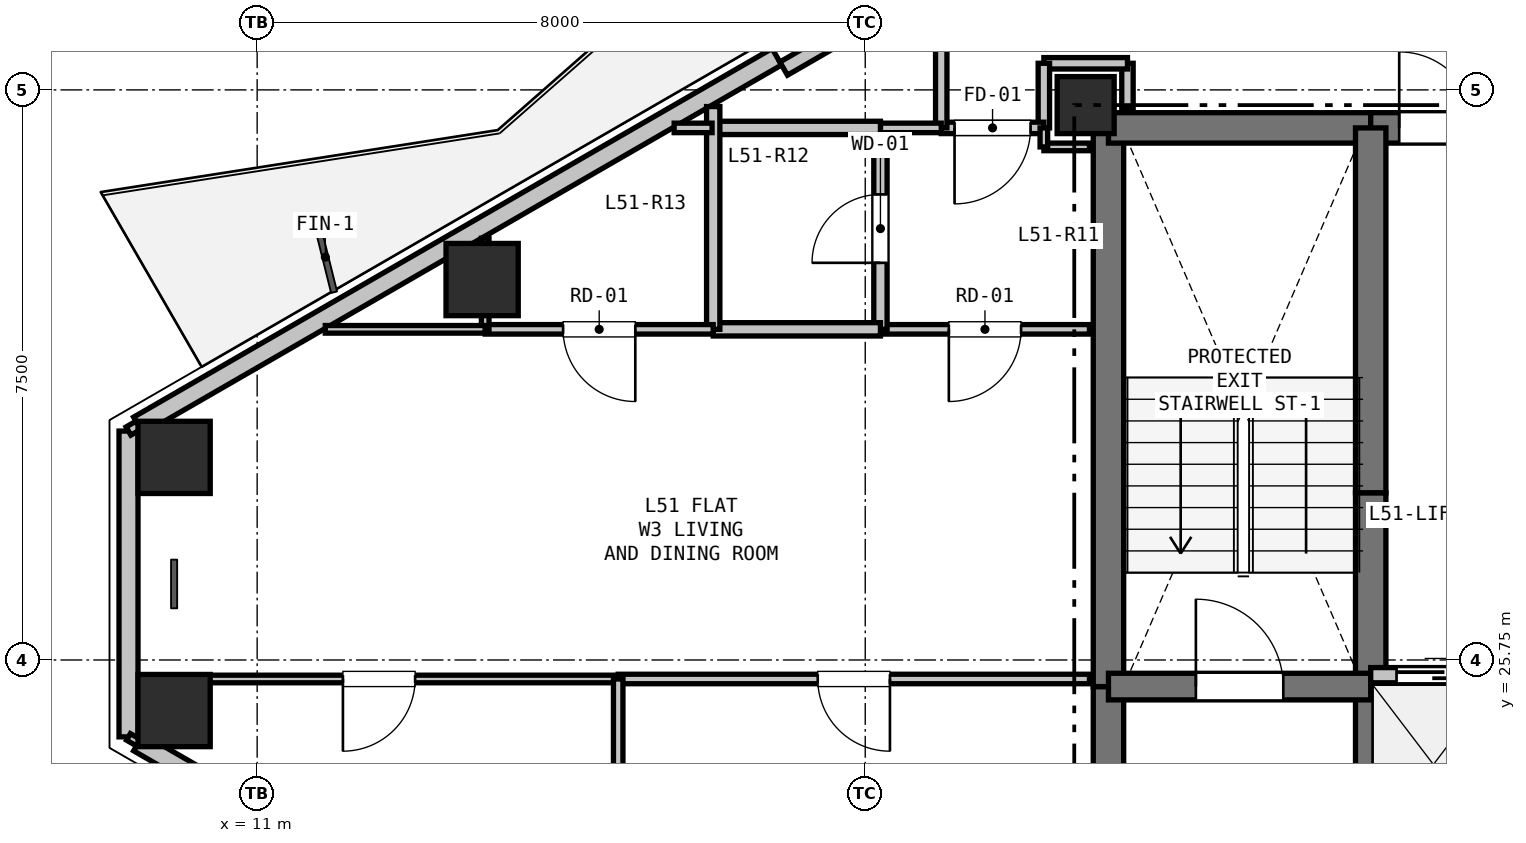
"""IFC4 building model, lengths in metres.
Left out: names, types, materials, properties, quantities, classifications, styles, units other than length and angle.
Written with IfcOpenShell. Run it as: python <this file> out.ifc"""

import sys

from ifc_helpers import new_model, si_unit, direction, frame, frame_2d, origin, origin_2d, place, context, subcontext, project, spatial, rectangle, hollow_rectangle, extrude, element, fill, save


model = new_model("IFC4")
c1 = context("Model", 3, precision=1e-05, world=origin(), true_north=direction((0.0, 1.0)))
c2 = subcontext(c1, "Body", "Model", "MODEL_VIEW")
j1 = project(units=[si_unit("LENGTHUNIT", "METRE"), si_unit("PLANEANGLEUNIT", "RADIAN")], contexts=[c1])
p1 = place(None, origin())
s1 = spatial("IfcSite", under=j1, at=p1, CompositionType="ELEMENT")
p2 = place(p1, origin())
s2 = spatial("IfcBuilding", under=s1, at=p2, CompositionType="ELEMENT")
p3 = place(p2, frame((0.0, 0.0, 185.4)))
s3 = spatial("IfcBuildingStorey", under=s2, at=p3, CompositionType="ELEMENT", Elevation=185.4)
p4 = place(p3, frame((21.9, 33.05, 0.0), z_axis=(0.0, 0.0, 1.0), x_axis=(1.0, 0.0, 0.0)))
e1 = element("IfcColumn", 1, at=p4, inside=s3, PredefinedType="COLUMN", context=c2, shape_type="SweptSolid", body=[
    extrude(rectangle(XDim=0.75, YDim=0.75, at=origin_2d()), origin(), (0.0, 0.0, 1.0), 3.3),
])
for number, where, z_axis, x_axis in (
    (2, (9.907, 28.415, 0.0), (0.0, 0.0, 1.0), (1.0, 0.0, 0.0)),
    (3, (13.96, 30.755, 0.0), (0.0, 0.0, 1.0), (1.0, 0.0, 0.0)),
    (4, (9.907, 25.085, 0.0), (0.0, 0.0, 1.0), (1.0, 0.0, 0.0)),
):
    element("IfcColumn", number, at=place(p3, frame(where, z_axis=z_axis, x_axis=x_axis)), inside=s3, PredefinedType="COLUMN", context=c2, shape_type="SweptSolid", body=[
        extrude(hollow_rectangle(XDim=0.95, YDim=0.95, WallThickness=0.028, at=origin_2d()), origin(), (0.0, 0.0, 1.0), 3.3),
    ])
p5 = place(p3, frame((9.308, 24.738, 0.0), z_axis=(0.0, 0.0, 1.0), x_axis=(0.0, 1.0, 0.0)))
e5 = element("IfcWall", 5, at=p5, inside=s3, PredefinedType="SOLIDWALL", context=c2, shape_type="SweptSolid", body=[
    extrude(rectangle(XDim=4.023, YDim=0.25, at=frame_2d((2.012, 0.0))), origin(), (0.0, 0.0, 1.0), 2.69),
])
p6 = place(p3, frame((9.438, 28.837, 0.0), z_axis=(0.0, 0.0, 1.0), x_axis=(0.866027133173, 0.499997004599, 0.0)))
e6 = element("IfcWall", 6, at=p6, inside=s3, PredefinedType="SOLIDWALL", context=c2, shape_type="SweptSolid", body=[
    extrude(rectangle(XDim=9.699, YDim=0.25, at=frame_2d((4.849, 0.0))), origin(), (0.0, 0.0, 1.0), 2.69),
])
p7 = place(p3, frame((17.927, 33.53, 0.0), z_axis=(0.0, 0.0, 1.0), x_axis=(0.86605165483, 0.499954529098, 0.0)))
e7 = element("IfcWall", 7, at=p7, inside=s3, PredefinedType="PARAPET", context=c2, shape_type="SweptSolid", body=[
    extrude(rectangle(XDim=1.7, YDim=0.2, at=frame_2d((0.85, 0.0))), origin(), (0.0, 0.0, 1.0), 2.69),
])
p8 = place(p3, frame((17.837, 19.814, 0.0), z_axis=(0.0, 0.0, 1.0), x_axis=(-0.866027133173, 0.499997004599, 0.0)))
e8 = element("IfcWall", 8, at=p8, inside=s3, PredefinedType="SOLIDWALL", context=c2, shape_type="SweptSolid", body=[
    extrude(rectangle(XDim=9.699, YDim=0.25, at=frame_2d((4.849, 0.0))), origin(), (0.0, 0.0, 1.0), 2.69),
])
p9 = place(p8, frame((5.512, 0.0, 0.9)))
e9 = element("IfcOpeningElement", 9, at=p9, cuts=e8, PredefinedType="OPENING", context=c2, shape_type="SweptSolid", body=[
    extrude(rectangle(XDim=1.2, YDim=1.4, at=frame_2d((0.6, 0.7))), frame((0.0, 0.135, 0.0), z_axis=(0.0, -1.0, 0.0), x_axis=(1.0, 0.0, 0.0)), (0.0, 0.0, 1.0), 0.27),
])
p10 = place(p3, frame((22.2, 20.75, 0.0), z_axis=(0.0, 0.0, 1.0), x_axis=(0.0, 1.0, 0.0)))
e10 = element("IfcWall", 10, at=p10, inside=s3, PredefinedType="SHEAR", context=c2, shape_type="SweptSolid", body=[
    extrude(rectangle(XDim=4.65, YDim=0.4, at=frame_2d((2.325, 0.0))), origin(), (0.0, 0.0, 1.0), 3.07),
])
p11 = place(p3, frame((22.2, 25.4, 0.0), z_axis=(0.0, 0.0, 1.0), x_axis=(0.0, 1.0, 0.0)))
e11 = element("IfcWall", 11, at=p11, inside=s3, PredefinedType="SHEAR", context=c2, shape_type="SweptSolid", body=[
    extrude(rectangle(XDim=7.35, YDim=0.4, at=frame_2d((3.675, 0.0))), origin(), (0.0, 0.0, 1.0), 3.07),
])
p12 = place(p3, frame((22.2, 32.75, 0.0), z_axis=(0.0, 0.0, 1.0), x_axis=(1.0, 0.0, 0.0)))
e12 = element("IfcWall", 12, at=p12, inside=s3, PredefinedType="SHEAR", context=c2, shape_type="SweptSolid", body=[
    extrude(rectangle(XDim=3.45, YDim=0.4, at=frame_2d((1.725, 0.0))), origin(), (0.0, 0.0, 1.0), 3.07),
])
p13 = place(p3, frame((25.65, 32.75, 0.0), z_axis=(0.0, 0.0, 1.0), x_axis=(1.0, 0.0, 0.0)))
e13 = element("IfcWall", 13, at=p13, inside=s3, PredefinedType="SHEAR", context=c2, shape_type="SweptSolid", body=[
    extrude(rectangle(XDim=1.75, YDim=0.4, at=frame_2d((0.875, 0.0))), origin(), (0.0, 0.0, 1.0), 3.07),
])
p14 = place(p13, frame((0.375, 0.0, 0.0)))
e14 = element("IfcOpeningElement", 14, at=p14, cuts=e13, PredefinedType="OPENING", context=c2, shape_type="SweptSolid", body=[
    extrude(rectangle(XDim=1.0, YDim=2.15, at=frame_2d((0.5, 1.075))), frame((0.0, 0.21, 0.0), z_axis=(0.0, -1.0, 0.0), x_axis=(1.0, 0.0, 0.0)), (0.0, 0.0, 1.0), 0.42),
])
p15 = place(p3, frame((25.65, 22.75, 0.0), z_axis=(0.0, 0.0, 1.0), x_axis=(0.0, 1.0, 0.0)))
e15 = element("IfcWall", 15, at=p15, inside=s3, PredefinedType="SHEAR", context=c2, shape_type="SweptSolid", body=[
    extrude(rectangle(XDim=2.8, YDim=0.4, at=frame_2d((1.4, 0.0))), origin(), (0.0, 0.0, 1.0), 3.07),
])
p16 = place(p3, frame((25.65, 25.55, 0.0), z_axis=(0.0, 0.0, 1.0), x_axis=(0.0, 1.0, 0.0)))
e16 = element("IfcWall", 16, at=p16, inside=s3, PredefinedType="SHEAR", context=c2, shape_type="SweptSolid", body=[
    extrude(rectangle(XDim=2.4, YDim=0.4, at=frame_2d((1.2, 0.0))), origin(), (0.0, 0.0, 1.0), 3.07),
])
p17 = place(p3, frame((25.65, 27.95, 0.0), z_axis=(0.0, 0.0, 1.0), x_axis=(0.0, 1.0, 0.0)))
e17 = element("IfcWall", 17, at=p17, inside=s3, PredefinedType="SHEAR", context=c2, shape_type="SweptSolid", body=[
    extrude(rectangle(XDim=4.8, YDim=0.4, at=frame_2d((2.4, 0.0))), origin(), (0.0, 0.0, 1.0), 3.07),
])
p18 = place(p3, frame((22.2, 25.4, 0.0), z_axis=(0.0, 0.0, 1.0), x_axis=(1.0, 0.0, 0.0)))
e18 = element("IfcWall", 18, at=p18, inside=s3, PredefinedType="SHEAR", context=c2, shape_type="SweptSolid", body=[
    extrude(rectangle(XDim=3.45, YDim=0.35, at=frame_2d((1.725, 0.0))), origin(), (0.0, 0.0, 1.0), 3.07),
])
p19 = place(p18, frame((1.15, 0.0, 0.0)))
e19 = element("IfcOpeningElement", 19, at=p19, cuts=e18, PredefinedType="OPENING", context=c2, shape_type="SweptSolid", body=[
    extrude(rectangle(XDim=1.15, YDim=2.15, at=frame_2d((0.575, 1.075))), frame((0.0, 0.185, 0.0), z_axis=(0.0, -1.0, 0.0), x_axis=(1.0, 0.0, 0.0)), (0.0, 0.0, 1.0), 0.37),
])
p20 = place(p3, frame((25.65, 25.55, 0.0), z_axis=(0.0, 0.0, 1.0), x_axis=(1.0, 0.0, 0.0)))
e20 = element("IfcWall", 20, at=p20, inside=s3, PredefinedType="PARTITIONING", context=c2, shape_type="SweptSolid", body=[
    extrude(rectangle(XDim=4.95, YDim=0.2, at=frame_2d((2.475, 0.0))), origin(), (0.0, 0.0, 1.0), 3.07),
])
p21 = place(p20, frame((0.34, 0.0, 0.0)))
e21 = element("IfcOpeningElement", 21, at=p21, cuts=e20, PredefinedType="OPENING", context=c2, shape_type="SweptSolid", body=[
    extrude(rectangle(XDim=1.1, YDim=2.15, at=frame_2d((0.55, 1.075))), frame((0.0, 0.11, 0.0), z_axis=(0.0, -1.0, 0.0), x_axis=(1.0, 0.0, 0.0)), (0.0, 0.0, 1.0), 0.22),
])
p22 = place(p20, frame((1.99, 0.0, 0.0)))
e22 = element("IfcOpeningElement", 22, at=p22, cuts=e20, PredefinedType="OPENING", context=c2, shape_type="SweptSolid", body=[
    extrude(rectangle(XDim=1.1, YDim=2.15, at=frame_2d((0.55, 1.075))), frame((0.0, 0.11, 0.0), z_axis=(0.0, -1.0, 0.0), x_axis=(1.0, 0.0, 0.0)), (0.0, 0.0, 1.0), 0.22),
])
p23 = place(p20, frame((3.64, 0.0, 0.0)))
e23 = element("IfcOpeningElement", 23, at=p23, cuts=e20, PredefinedType="OPENING", context=c2, shape_type="SweptSolid", body=[
    extrude(rectangle(XDim=1.1, YDim=2.15, at=frame_2d((0.55, 1.075))), frame((0.0, 0.11, 0.0), z_axis=(0.0, -1.0, 0.0), x_axis=(1.0, 0.0, 0.0)), (0.0, 0.0, 1.0), 0.22),
])
p24 = place(p3, frame((22.45, 33.0, 0.0), z_axis=(0.0, 0.0, 1.0), x_axis=(0.0, 1.0, 0.0)))
e24 = element("IfcWall", 24, at=p24, inside=s3, PredefinedType="PARTITIONING", context=c2, shape_type="SweptSolid", body=[
    extrude(rectangle(XDim=0.6, YDim=0.15, at=frame_2d((0.3, 0.0))), origin(), (0.0, 0.0, 1.0), 2.595),
])
p25 = place(p3, frame((22.45, 33.6, 0.0), z_axis=(0.0, 0.0, 1.0), x_axis=(-1.0, 0.0, 0.0)))
e25 = element("IfcWall", 25, at=p25, inside=s3, PredefinedType="PARTITIONING", context=c2, shape_type="SweptSolid", body=[
    extrude(rectangle(XDim=1.1, YDim=0.15, at=frame_2d((0.55, 0.0))), origin(), (0.0, 0.0, 1.0), 3.07),
])
p26 = place(p3, frame((21.35, 33.6, 0.0), z_axis=(0.0, 0.0, 1.0), x_axis=(0.0, -1.0, 0.0)))
e26 = element("IfcWall", 26, at=p26, inside=s3, PredefinedType="PARTITIONING", context=c2, shape_type="SweptSolid", body=[
    extrude(rectangle(XDim=0.85, YDim=0.15, at=frame_2d((0.425, 0.0))), origin(), (0.0, 0.0, 1.0), 2.518),
])
p27 = place(p3, frame((21.35, 32.75, 0.0), z_axis=(0.0, 0.0, 1.0), x_axis=(-1.0, 0.0, 0.0)))
e27 = element("IfcWall", 27, at=p27, inside=s3, PredefinedType="PARTITIONING", context=c2, shape_type="SweptSolid", body=[
    extrude(rectangle(XDim=1.35, YDim=0.15, at=frame_2d((0.675, 0.0))), origin(), (0.0, 0.0, 1.0), 2.518),
])
p28 = place(p27, frame((0.175, 0.0, 0.0)))
e28 = element("IfcOpeningElement", 28, at=p28, cuts=e27, PredefinedType="OPENING", context=c2, shape_type="SweptSolid", body=[
    extrude(rectangle(XDim=1.0, YDim=2.15, at=frame_2d((0.5, 1.075))), frame((0.0, 0.085, 0.0), z_axis=(0.0, -1.0, 0.0), x_axis=(1.0, 0.0, 0.0)), (0.0, 0.0, 1.0), 0.17),
])
p29 = place(p3, frame((20.0, 32.75, 0.0), z_axis=(0.0, 0.0, 1.0), x_axis=(0.0, 1.0, 0.0)))
e29 = element("IfcWall", 29, at=p29, inside=s3, PredefinedType="PARTITIONING", context=c2, shape_type="SweptSolid", body=[
    extrude(rectangle(XDim=2.141, YDim=0.15, at=frame_2d((1.071, 0.0))), origin(), (0.0, 0.0, 1.0), 2.365),
])
p30 = place(p3, frame((21.35, 32.5, 0.0), z_axis=(0.0, 0.0, 1.0), x_axis=(1.0, 0.0, 0.0)))
e30 = element("IfcWall", 30, at=p30, inside=s3, PredefinedType="PARTITIONING", context=c2, shape_type="SweptSolid", body=[
    extrude(rectangle(XDim=0.6, YDim=0.1, at=frame_2d((0.3, 0.0))), origin(), (0.0, 0.0, 1.0), 2.595),
])
p31 = place(p3, frame((21.95, 30.1, 0.0), z_axis=(0.0, 0.0, 1.0), x_axis=(-1.0, 0.0, 0.0)))
e31 = element("IfcWall", 31, at=p31, inside=s3, PredefinedType="PARTITIONING", context=c2, shape_type="SweptSolid", body=[
    extrude(rectangle(XDim=2.75, YDim=0.125, at=frame_2d((1.375, 0.0))), origin(), (0.0, 0.0, 1.0), 2.595),
])
p32 = place(p31, frame((0.9, 0.0, 0.0)))
e32 = element("IfcOpeningElement", 32, at=p32, cuts=e31, PredefinedType="OPENING", context=c2, shape_type="SweptSolid", body=[
    extrude(rectangle(XDim=0.95, YDim=2.1, at=frame_2d((0.475, 1.05))), frame((0.0, 0.073, 0.0), z_axis=(0.0, -1.0, 0.0), x_axis=(1.0, 0.0, 0.0)), (0.0, 0.0, 1.0), 0.145),
])
p33 = place(p3, frame((19.2, 30.1, 0.0), z_axis=(0.0, 0.0, 1.0), x_axis=(0.0, 1.0, 0.0)))
e33 = element("IfcWall", 33, at=p33, inside=s3, PredefinedType="PLUMBINGWALL", context=c2, shape_type="SweptSolid", body=[
    extrude(rectangle(XDim=2.65, YDim=0.175, at=frame_2d((1.325, 0.0))), origin(), (0.0, 0.0, 1.0), 2.518),
])
p34 = place(p33, frame((0.875, 0.0, 0.0)))
e34 = element("IfcOpeningElement", 34, at=p34, cuts=e33, PredefinedType="OPENING", context=c2, shape_type="SweptSolid", body=[
    extrude(rectangle(XDim=0.9, YDim=2.1, at=frame_2d((0.45, 1.05))), frame((0.0, 0.097, 0.0), z_axis=(0.0, -1.0, 0.0), x_axis=(1.0, 0.0, 0.0)), (0.0, 0.0, 1.0), 0.195),
])
p35 = place(p3, frame((19.2, 32.75, 0.0), z_axis=(0.0, 0.0, 1.0), x_axis=(1.0, 0.0, 0.0)))
e35 = element("IfcWall", 35, at=p35, inside=s3, PredefinedType="PARTITIONING", context=c2, shape_type="SweptSolid", body=[
    extrude(rectangle(XDim=0.8, YDim=0.125, at=frame_2d((0.4, 0.0))), origin(), (0.0, 0.0, 1.0), 3.07),
])
p36 = place(p3, frame((21.35, 32.75, 0.0), z_axis=(0.0, 0.0, 1.0), x_axis=(0.0, -1.0, 0.0)))
e36 = element("IfcWall", 36, at=p36, inside=s3, PredefinedType="PARTITIONING", context=c2, shape_type="SweptSolid", body=[
    extrude(rectangle(XDim=0.25, YDim=0.1, at=frame_2d((0.125, 0.0))), origin(), (0.0, 0.0, 1.0), 3.07),
])
p37 = place(p3, frame((17.0, 32.75, 0.0), z_axis=(0.0, 0.0, 1.0), x_axis=(1.0, 0.0, 0.0)))
e37 = element("IfcWall", 37, at=p37, inside=s3, PredefinedType="PLUMBINGWALL", context=c2, shape_type="SweptSolid", body=[
    extrude(rectangle(XDim=2.2, YDim=0.175, at=frame_2d((1.1, 0.0))), origin(), (0.0, 0.0, 1.0), 2.365),
])
p38 = place(p3, frame((19.2, 30.1, 0.0), z_axis=(0.0, 0.0, 1.0), x_axis=(-1.0, 0.0, 0.0)))
e38 = element("IfcWall", 38, at=p38, inside=s3, PredefinedType="PLUMBINGWALL", context=c2, shape_type="SweptSolid", body=[
    extrude(rectangle(XDim=2.2, YDim=0.175, at=frame_2d((1.1, 0.0))), origin(), (0.0, 0.0, 1.0), 3.07),
])
p39 = place(p3, frame((17.0, 30.1, 0.0), z_axis=(0.0, 0.0, 1.0), x_axis=(0.0, 1.0, 0.0)))
e39 = element("IfcWall", 39, at=p39, inside=s3, PredefinedType="PLUMBINGWALL", context=c2, shape_type="SweptSolid", body=[
    extrude(rectangle(XDim=2.931, YDim=0.175, at=frame_2d((1.465, 0.0))), origin(), (0.0, 0.0, 1.0), 2.365),
])
p40 = place(p3, frame((17.0, 30.1, 0.0), z_axis=(0.0, 0.0, 1.0), x_axis=(-1.0, 0.0, 0.0)))
e40 = element("IfcWall", 40, at=p40, inside=s3, PredefinedType="PARTITIONING", context=c2, shape_type="SweptSolid", body=[
    extrude(rectangle(XDim=3.0, YDim=0.125, at=frame_2d((1.5, 0.0))), origin(), (0.0, 0.0, 1.0), 3.07),
])
p41 = place(p40, frame((1.025, 0.0, 0.0)))
e41 = element("IfcOpeningElement", 41, at=p41, cuts=e40, PredefinedType="OPENING", context=c2, shape_type="SweptSolid", body=[
    extrude(rectangle(XDim=0.95, YDim=2.1, at=frame_2d((0.475, 1.05))), frame((0.0, 0.073, 0.0), z_axis=(0.0, -1.0, 0.0), x_axis=(1.0, 0.0, 0.0)), (0.0, 0.0, 1.0), 0.145),
])
p42 = place(p3, frame((14.0, 30.1, 0.0), z_axis=(0.0, 0.0, 1.0), x_axis=(0.0, 1.0, 0.0)))
e42 = element("IfcWall", 42, at=p42, inside=s3, PredefinedType="PARTITIONING", context=c2, shape_type="SweptSolid", body=[
    extrude(rectangle(XDim=1.199, YDim=0.1, at=frame_2d((0.599, 0.0))), origin(), (0.0, 0.0, 1.0), 3.07),
])
p43 = place(p3, frame((16.486, 32.75, 0.0), z_axis=(0.0, 0.0, 1.0), x_axis=(1.0, 0.0, 0.0)))
e43 = element("IfcWall", 43, at=p43, inside=s3, PredefinedType="PARTITIONING", context=c2, shape_type="SweptSolid", body=[
    extrude(rectangle(XDim=0.499, YDim=0.125, at=frame_2d((0.25, 0.0))), origin(), (0.0, 0.0, 1.0), 3.07),
])
p44 = place(p3, frame((11.896, 30.1, 0.0), z_axis=(0.0, 0.0, 1.0), x_axis=(1.0, 0.0, 0.0)))
e44 = element("IfcWall", 44, at=p44, inside=s3, PredefinedType="PARTITIONING", context=c2, shape_type="SweptSolid", body=[
    extrude(rectangle(XDim=2.104, YDim=0.1, at=frame_2d((1.052, 0.0))), origin(), (0.0, 0.0, 1.0), 2.735),
])
p45 = place(p3, frame((21.95, 25.5, 0.0), z_axis=(0.0, 0.0, 1.0), x_axis=(-1.0, 0.0, 0.0)))
e45 = element("IfcWall", 45, at=p45, inside=s3, PredefinedType="PARTITIONING", context=c2, shape_type="SweptSolid", body=[
    extrude(rectangle(XDim=6.2, YDim=0.125, at=frame_2d((3.1, 0.0))), origin(), (0.0, 0.0, 1.0), 2.595),
])
p46 = place(p45, frame((2.625, 0.0, 0.0)))
e46 = element("IfcOpeningElement", 46, at=p46, cuts=e45, PredefinedType="OPENING", context=c2, shape_type="SweptSolid", body=[
    extrude(rectangle(XDim=0.95, YDim=2.1, at=frame_2d((0.475, 1.05))), frame((0.0, 0.073, 0.0), z_axis=(0.0, -1.0, 0.0), x_axis=(1.0, 0.0, 0.0)), (0.0, 0.0, 1.0), 0.145),
])
p47 = place(p3, frame((15.75, 25.5, 0.0), z_axis=(0.0, 0.0, 1.0), x_axis=(-1.0, 0.0, 0.0)))
e47 = element("IfcWall", 47, at=p47, inside=s3, PredefinedType="PARTITIONING", context=c2, shape_type="SweptSolid", body=[
    extrude(rectangle(XDim=6.293, YDim=0.1, at=frame_2d((3.147, 0.0))), origin(), (0.0, 0.0, 1.0), 2.735),
])
p48 = place(p47, frame((2.672, 0.0, 0.0)))
e48 = element("IfcOpeningElement", 48, at=p48, cuts=e47, PredefinedType="OPENING", context=c2, shape_type="SweptSolid", body=[
    extrude(rectangle(XDim=0.95, YDim=2.1, at=frame_2d((0.475, 1.05))), frame((0.0, 0.06, 0.0), z_axis=(0.0, -1.0, 0.0), x_axis=(1.0, 0.0, 0.0)), (0.0, 0.0, 1.0), 0.12),
])
p49 = place(p3, frame((9.307, 28.762, 0.0), z_axis=(0.0, 0.0, 1.0), x_axis=(0.866239593359, 0.499628829129, 0.0)))
e49 = element("IfcWall", 49, at=p49, inside=s3, PredefinedType="PARTITIONING", context=c2, shape_type="SweptSolid", body=[
    extrude(rectangle(XDim=0.15, YDim=0.125, at=frame_2d((0.075, 0.0))), origin(), (0.0, 0.0, 1.0), 3.07),
])
p50 = place(p3, frame((9.437, 24.663, 0.0), z_axis=(0.0, 0.0, 1.0), x_axis=(-0.866239593359, 0.499628829129, 0.0)))
e50 = element("IfcWall", 50, at=p50, inside=s3, PredefinedType="PARTITIONING", context=c2, shape_type="SweptSolid", body=[
    extrude(rectangle(XDim=0.15, YDim=0.1, at=frame_2d((0.075, 0.0))), origin(), (0.0, 0.0, 1.0), 3.07),
])
p51 = place(p3, frame((15.75, 25.5, 0.0), z_axis=(0.0, 0.0, 1.0), x_axis=(0.0, -1.0, 0.0)))
e51 = element("IfcWall", 51, at=p51, inside=s3, PredefinedType="PARTITIONING", context=c2, shape_type="SweptSolid", body=[
    extrude(rectangle(XDim=4.309, YDim=0.125, at=frame_2d((2.155, 0.0))), origin(), (0.0, 0.0, 1.0), 2.365),
])
p52 = place(p51, frame((1.68, 0.0, 0.0)))
e52 = element("IfcOpeningElement", 52, at=p52, cuts=e51, PredefinedType="OPENING", context=c2, shape_type="SweptSolid", body=[
    extrude(rectangle(XDim=0.95, YDim=2.1, at=frame_2d((0.475, 1.05))), frame((0.0, 0.073, 0.0), z_axis=(0.0, -1.0, 0.0), x_axis=(1.0, 0.0, 0.0)), (0.0, 0.0, 1.0), 0.145),
])
p53 = place(p21, origin())
e53 = element("IfcDoor", 53, at=p53, inside=s3, OperationType="SLIDING_TO_LEFT", PredefinedType="DOOR", context=c2, shape_type="SweptSolid", body=[
    extrude(rectangle(XDim=1.1, YDim=2.15, at=frame_2d((0.55, 1.075))), frame((0.0, 0.025, 0.0), z_axis=(0.0, -1.0, 0.0), x_axis=(1.0, 0.0, 0.0)), (0.0, 0.0, 1.0), 0.05),
])
fill(e21, e53)
p54 = place(p14, origin())
e54 = element("IfcDoor", 54, at=p54, inside=s3, OperationType="SINGLE_SWING_LEFT", PredefinedType="DOOR", context=c2, shape_type="SweptSolid", body=[
    extrude(rectangle(XDim=1.0, YDim=2.15, at=frame_2d((0.5, 1.075))), frame((0.0, 0.025, 0.0), z_axis=(0.0, -1.0, 0.0), x_axis=(1.0, 0.0, 0.0)), (0.0, 0.0, 1.0), 0.05),
])
fill(e14, e54)
p55 = place(p19, origin())
e55 = element("IfcDoor", 55, at=p55, inside=s3, OperationType="SINGLE_SWING_LEFT", PredefinedType="DOOR", context=c2, shape_type="SweptSolid", body=[
    extrude(rectangle(XDim=1.15, YDim=2.15, at=frame_2d((0.575, 1.075))), frame((0.0, 0.025, 0.0), z_axis=(0.0, -1.0, 0.0), x_axis=(1.0, 0.0, 0.0)), (0.0, 0.0, 1.0), 0.05),
])
fill(e19, e55)
p56 = place(p28, origin())
e56 = element("IfcDoor", 56, at=p56, inside=s3, OperationType="SINGLE_SWING_RIGHT", PredefinedType="DOOR", context=c2, shape_type="SweptSolid", body=[
    extrude(rectangle(XDim=1.0, YDim=2.15, at=frame_2d((0.5, 1.075))), frame((0.0, 0.025, 0.0), z_axis=(0.0, -1.0, 0.0), x_axis=(1.0, 0.0, 0.0)), (0.0, 0.0, 1.0), 0.05),
])
fill(e28, e56)
p57 = place(p34, origin())
e57 = element("IfcDoor", 57, at=p57, inside=s3, OperationType="SINGLE_SWING_LEFT", PredefinedType="DOOR", context=c2, shape_type="SweptSolid", body=[
    extrude(rectangle(XDim=0.9, YDim=2.1, at=frame_2d((0.45, 1.05))), frame((0.0, 0.025, 0.0), z_axis=(0.0, -1.0, 0.0), x_axis=(1.0, 0.0, 0.0)), (0.0, 0.0, 1.0), 0.05),
])
fill(e34, e57)
p58 = place(p32, origin())
e58 = element("IfcDoor", 58, at=p58, inside=s3, OperationType="SINGLE_SWING_RIGHT", PredefinedType="DOOR", context=c2, shape_type="SweptSolid", body=[
    extrude(rectangle(XDim=0.95, YDim=2.1, at=frame_2d((0.475, 1.05))), frame((0.0, 0.025, 0.0), z_axis=(0.0, -1.0, 0.0), x_axis=(1.0, 0.0, 0.0)), (0.0, 0.0, 1.0), 0.05),
])
fill(e32, e58)
p59 = place(p41, origin())
e59 = element("IfcDoor", 59, at=p59, inside=s3, OperationType="SINGLE_SWING_LEFT", PredefinedType="DOOR", context=c2, shape_type="SweptSolid", body=[
    extrude(rectangle(XDim=0.95, YDim=2.1, at=frame_2d((0.475, 1.05))), frame((0.0, 0.025, 0.0), z_axis=(0.0, -1.0, 0.0), x_axis=(1.0, 0.0, 0.0)), (0.0, 0.0, 1.0), 0.05),
])
fill(e41, e59)
p60 = place(p48, origin())
e60 = element("IfcDoor", 60, at=p60, inside=s3, OperationType="SINGLE_SWING_RIGHT", PredefinedType="DOOR", context=c2, shape_type="SweptSolid", body=[
    extrude(rectangle(XDim=0.95, YDim=2.1, at=frame_2d((0.475, 1.05))), frame((0.0, 0.025, 0.0), z_axis=(0.0, -1.0, 0.0), x_axis=(1.0, 0.0, 0.0)), (0.0, 0.0, 1.0), 0.05),
])
fill(e48, e60)
p61 = place(p46, origin())
e61 = element("IfcDoor", 61, at=p61, inside=s3, OperationType="SINGLE_SWING_LEFT", PredefinedType="DOOR", context=c2, shape_type="SweptSolid", body=[
    extrude(rectangle(XDim=0.95, YDim=2.1, at=frame_2d((0.475, 1.05))), frame((0.0, 0.025, 0.0), z_axis=(0.0, -1.0, 0.0), x_axis=(1.0, 0.0, 0.0)), (0.0, 0.0, 1.0), 0.05),
])
fill(e46, e61)
save(model, sys.argv[1])
